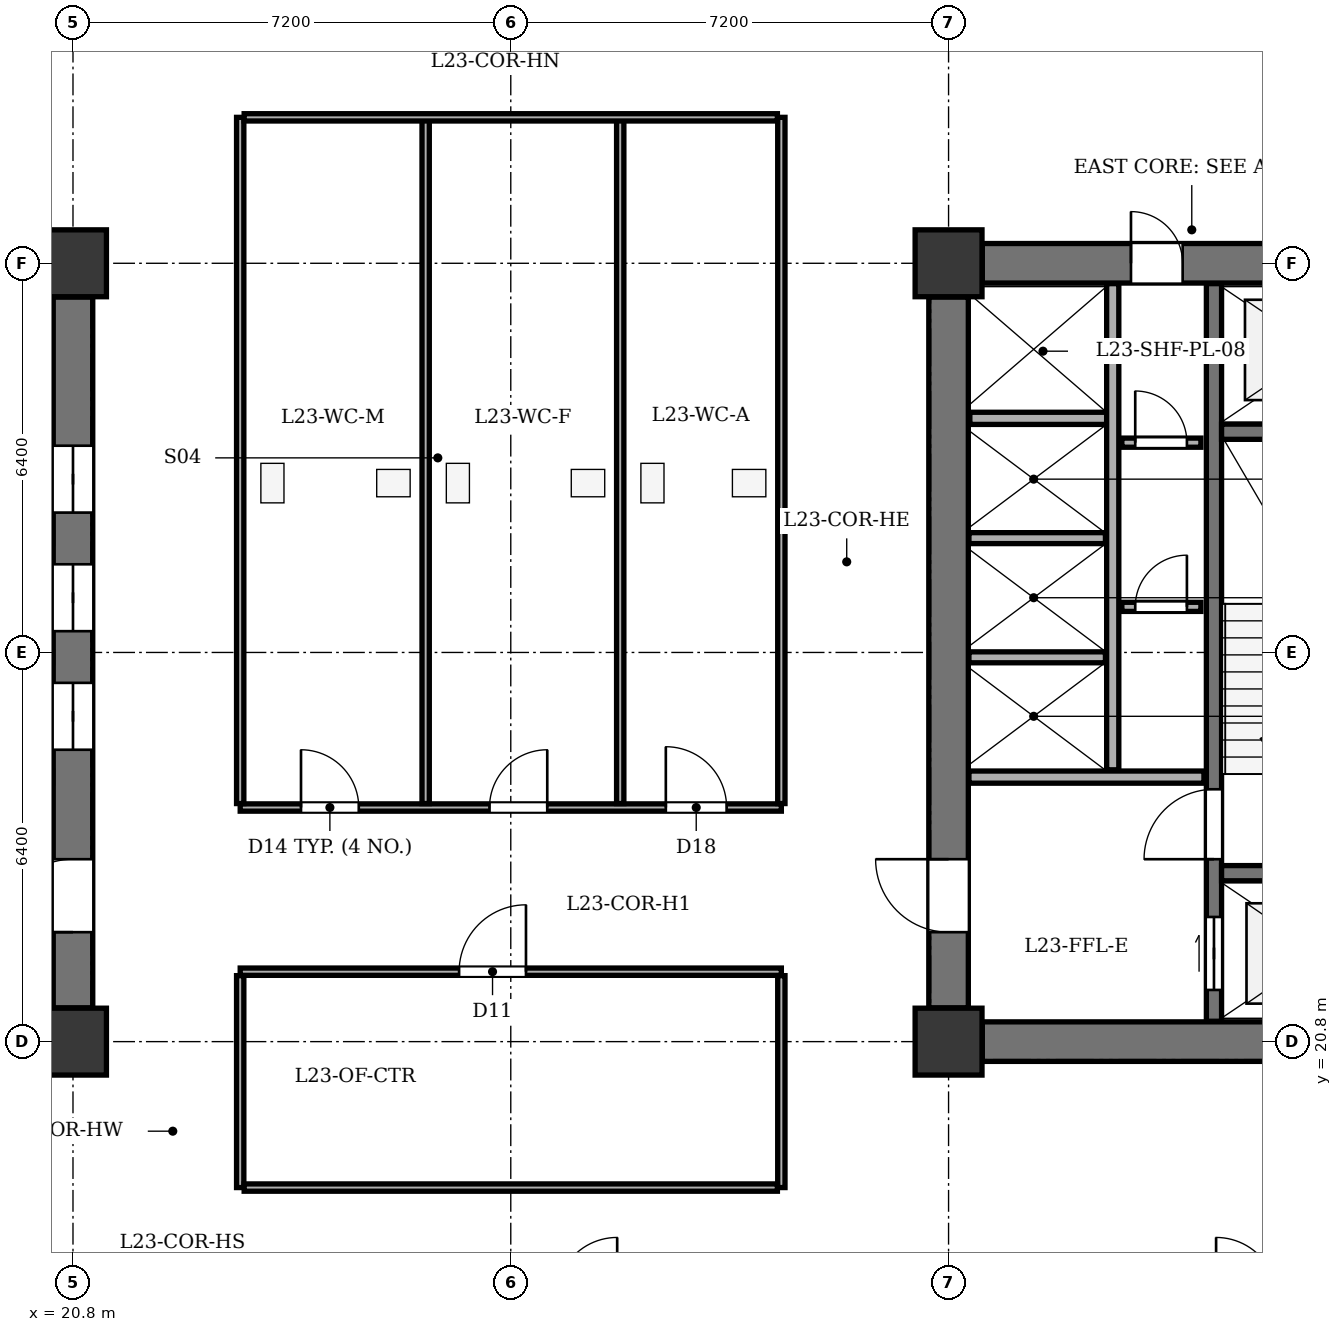
"""IFC4 building model, lengths in metres.
Left out: names, types, materials, properties, quantities, classifications, styles, units other than length and angle.
Written with IfcOpenShell. Run it as: python <this file> out.ifc"""

import sys

from ifc_helpers import new_model, si_unit, direction, frame, frame_2d, origin, origin_2d, place, context, subcontext, project, spatial, rectangle, extrude, element, fill, save


model = new_model("IFC4")
c1 = context("Model", 3, precision=1e-05, world=origin(), true_north=direction((0.0, 1.0)))
c2 = subcontext(c1, "Body", "Model", "MODEL_VIEW")
j1 = project(units=[si_unit("LENGTHUNIT", "METRE"), si_unit("PLANEANGLEUNIT", "RADIAN")], contexts=[c1])
p1 = place(None, origin())
s1 = spatial("IfcSite", under=j1, at=p1, CompositionType="ELEMENT")
p2 = place(p1, origin())
s2 = spatial("IfcBuilding", under=s1, at=p2, CompositionType="ELEMENT")
p3 = place(p2, frame((0.0, 0.0, 94.5)))
s3 = spatial("IfcBuildingStorey", under=s2, at=p3, CompositionType="ELEMENT", Elevation=94.5)
for number, where, z_axis, x_axis in (
    (1, (20.8, 20.8, 0.0), (0.0, 0.0, 1.0), (1.0, 0.0, 0.0)),
    (2, (20.8, 33.6, 0.0), (0.0, 0.0, 1.0), (1.0, 0.0, 0.0)),
    (3, (35.2, 20.8, 0.0), (0.0, 0.0, 1.0), (1.0, 0.0, 0.0)),
    (4, (35.2, 33.6, 0.0), (0.0, 0.0, 1.0), (1.0, 0.0, 0.0)),
):
    element("IfcColumn", number, at=place(p3, frame(where, z_axis=z_axis, x_axis=x_axis)), inside=s3, PredefinedType="COLUMN", context=c2, shape_type="SweptSolid", body=[
        extrude(rectangle(XDim=1.1, YDim=1.1, at=origin_2d()), origin(), (0.0, 0.0, 1.0), 3.9),
    ])
p4 = place(p3, frame((20.8, 21.355, 0.0), z_axis=(0.0, 0.0, 1.0), x_axis=(0.0, 1.0, 0.0)))
e5 = element("IfcWall", 5, at=p4, inside=s3, PredefinedType="SHEAR", context=c2, shape_type="SweptSolid", body=[
    extrude(rectangle(XDim=11.69, YDim=0.65, at=frame_2d((5.845, 0.0))), origin(), (0.0, 0.0, 1.0), 3.6),
])
p5 = place(p4, frame((1.245, 0.0, 0.0)))
e6 = element("IfcOpeningElement", 6, at=p5, cuts=e5, PredefinedType="OPENING", context=c2, shape_type="SweptSolid", body=[
    extrude(rectangle(XDim=1.2, YDim=2.15, at=frame_2d((0.6, 1.075))), frame((0.0, 0.335, 0.0), z_axis=(0.0, -1.0, 0.0), x_axis=(1.0, 0.0, 0.0)), (0.0, 0.0, 1.0), 0.67),
])
p6 = place(p4, frame((4.245, 0.0, 0.0)))
e7 = element("IfcOpeningElement", 7, at=p6, cuts=e5, PredefinedType="OPENING", context=c2, shape_type="SweptSolid", body=[
    extrude(rectangle(XDim=1.1, YDim=2.1, at=frame_2d((0.55, 1.05))), frame((0.0, 0.335, 0.0), z_axis=(0.0, -1.0, 0.0), x_axis=(1.0, 0.0, 0.0)), (0.0, 0.0, 1.0), 0.67),
])
p7 = place(p4, frame((6.195, 0.0, 0.0)))
e8 = element("IfcOpeningElement", 8, at=p7, cuts=e5, PredefinedType="OPENING", context=c2, shape_type="SweptSolid", body=[
    extrude(rectangle(XDim=1.1, YDim=2.1, at=frame_2d((0.55, 1.05))), frame((0.0, 0.335, 0.0), z_axis=(0.0, -1.0, 0.0), x_axis=(1.0, 0.0, 0.0)), (0.0, 0.0, 1.0), 0.67),
])
p8 = place(p4, frame((8.145, 0.0, 0.0)))
e9 = element("IfcOpeningElement", 9, at=p8, cuts=e5, PredefinedType="OPENING", context=c2, shape_type="SweptSolid", body=[
    extrude(rectangle(XDim=1.1, YDim=2.1, at=frame_2d((0.55, 1.05))), frame((0.0, 0.335, 0.0), z_axis=(0.0, -1.0, 0.0), x_axis=(1.0, 0.0, 0.0)), (0.0, 0.0, 1.0), 0.67),
])
p9 = place(p3, frame((16.6, 25.15, 0.0), z_axis=(0.0, 0.0, 1.0), x_axis=(1.0, 0.0, 0.0)))
e10 = element("IfcWall", 10, at=p9, inside=s3, PredefinedType="SOLIDWALL", context=c2, shape_type="SweptSolid", body=[
    extrude(rectangle(XDim=3.865, YDim=0.2, at=frame_2d((1.933, 0.0))), origin(), (0.0, 0.0, 1.0), 3.6),
])
p10 = place(p9, frame((0.3, 0.0, 0.0)))
e11 = element("IfcOpeningElement", 11, at=p10, cuts=e10, PredefinedType="OPENING", context=c2, shape_type="SweptSolid", body=[
    extrude(rectangle(XDim=0.85, YDim=2.02, at=frame_2d((0.425, 1.01))), frame((0.0, 0.11, 0.0), z_axis=(0.0, -1.0, 0.0), x_axis=(1.0, 0.0, 0.0)), (0.0, 0.0, 1.0), 0.22),
])
for number, where, z_axis, x_axis in (
    (12, (18.22, 27.12, 0.0), (0.0, 0.0, 1.0), (1.0, 0.0, 0.0)),
    (13, (18.22, 29.08, 0.0), (0.0, 0.0, 1.0), (1.0, 0.0, 0.0)),
):
    element("IfcWall", number, at=place(p3, frame(where, z_axis=z_axis, x_axis=x_axis)), inside=s3, PredefinedType="PARTITIONING", context=c2, shape_type="SweptSolid", body=[
        extrude(rectangle(XDim=2.245, YDim=0.18, at=frame_2d((1.123, 0.0))), origin(), (0.0, 0.0, 1.0), 3.6),
    ])
p11 = place(p3, frame((35.755, 20.8, 0.0), z_axis=(0.0, 0.0, 1.0), x_axis=(1.0, 0.0, 0.0)))
e14 = element("IfcWall", 14, at=p11, inside=s3, PredefinedType="SHEAR", context=c2, shape_type="SweptSolid", body=[
    extrude(rectangle(XDim=6.89, YDim=0.65, at=frame_2d((3.445, 0.0))), origin(), (0.0, 0.0, 1.0), 3.6),
])
p12 = place(p3, frame((35.755, 33.6, 0.0), z_axis=(0.0, 0.0, 1.0), x_axis=(1.0, 0.0, 0.0)))
e15 = element("IfcWall", 15, at=p12, inside=s3, PredefinedType="SHEAR", context=c2, shape_type="SweptSolid", body=[
    extrude(rectangle(XDim=6.89, YDim=0.65, at=frame_2d((3.445, 0.0))), origin(), (0.0, 0.0, 1.0), 3.6),
])
p13 = place(p12, frame((4.645, 0.0, 0.0)))
e16 = element("IfcOpeningElement", 16, at=p13, cuts=e15, PredefinedType="OPENING", context=c2, shape_type="SweptSolid", body=[
    extrude(rectangle(XDim=1.3, YDim=2.15, at=frame_2d((0.65, 1.075))), frame((0.0, 0.335, 0.0), z_axis=(0.0, -1.0, 0.0), x_axis=(1.0, 0.0, 0.0)), (0.0, 0.0, 1.0), 0.67),
])
p14 = place(p12, frame((2.445, 0.0, 0.0)))
e17 = element("IfcOpeningElement", 17, at=p14, cuts=e15, PredefinedType="OPENING", context=c2, shape_type="SweptSolid", body=[
    extrude(rectangle(XDim=0.85, YDim=2.02, at=frame_2d((0.425, 1.01))), frame((0.0, 0.335, 0.0), z_axis=(0.0, -1.0, 0.0), x_axis=(1.0, 0.0, 0.0)), (0.0, 0.0, 1.0), 0.67),
])
p15 = place(p3, frame((35.2, 21.355, 0.0), z_axis=(0.0, 0.0, 1.0), x_axis=(0.0, 1.0, 0.0)))
e18 = element("IfcWall", 18, at=p15, inside=s3, PredefinedType="SHEAR", context=c2, shape_type="SweptSolid", body=[
    extrude(rectangle(XDim=11.69, YDim=0.65, at=frame_2d((5.845, 0.0))), origin(), (0.0, 0.0, 1.0), 3.6),
])
p16 = place(p15, frame((1.245, 0.0, 0.0)))
e19 = element("IfcOpeningElement", 19, at=p16, cuts=e18, PredefinedType="OPENING", context=c2, shape_type="SweptSolid", body=[
    extrude(rectangle(XDim=1.2, YDim=2.15, at=frame_2d((0.6, 1.075))), frame((0.0, 0.335, 0.0), z_axis=(0.0, -1.0, 0.0), x_axis=(1.0, 0.0, 0.0)), (0.0, 0.0, 1.0), 0.67),
])
p17 = place(p3, frame((39.565, 21.135, 0.0), z_axis=(0.0, 0.0, 1.0), x_axis=(0.0, 1.0, 0.0)))
e20 = element("IfcWall", 20, at=p17, inside=s3, PredefinedType="SHEAR", context=c2, shape_type="SweptSolid", body=[
    extrude(rectangle(XDim=12.13, YDim=0.25, at=frame_2d((6.065, 0.0))), origin(), (0.0, 0.0, 1.0), 3.6),
])
p18 = place(p17, frame((0.515, 0.0, 0.0)))
e21 = element("IfcOpeningElement", 21, at=p18, cuts=e20, PredefinedType="OPENING", context=c2, shape_type="SweptSolid", body=[
    extrude(rectangle(XDim=1.2, YDim=2.15, at=frame_2d((0.6, 1.075))), frame((0.0, 0.135, 0.0), z_axis=(0.0, -1.0, 0.0), x_axis=(1.0, 0.0, 0.0)), (0.0, 0.0, 1.0), 0.27),
])
p19 = place(p17, frame((2.665, 0.0, 0.0)))
e22 = element("IfcOpeningElement", 22, at=p19, cuts=e20, PredefinedType="OPENING", context=c2, shape_type="SweptSolid", body=[
    extrude(rectangle(XDim=1.15, YDim=2.15, at=frame_2d((0.575, 1.075))), frame((0.0, 0.135, 0.0), z_axis=(0.0, -1.0, 0.0), x_axis=(1.0, 0.0, 0.0)), (0.0, 0.0, 1.0), 0.27),
])
for number, where, z_axis, x_axis in (
    (23, (39.69, 23.57, 0.0), (0.0, 0.0, 1.0), (1.0, 0.0, 0.0)),
    (24, (39.69, 30.83, 0.0), (0.0, 0.0, 1.0), (1.0, 0.0, 0.0)),
):
    element("IfcWall", number, at=place(p3, frame(where, z_axis=z_axis, x_axis=x_axis)), inside=s3, PredefinedType="SHEAR", context=c2, shape_type="SweptSolid", body=[
        extrude(rectangle(XDim=3.175, YDim=0.25, at=frame_2d((1.587, 0.0))), origin(), (0.0, 0.0, 1.0), 3.6),
    ])
p20 = place(p3, frame((35.535, 25.15, 0.0), z_axis=(0.0, 0.0, 1.0), x_axis=(1.0, 0.0, 0.0)))
e25 = element("IfcWall", 25, at=p20, inside=s3, PredefinedType="SOLIDWALL", context=c2, shape_type="SweptSolid", body=[
    extrude(rectangle(XDim=3.865, YDim=0.2, at=frame_2d((1.933, 0.0))), origin(), (0.0, 0.0, 1.0), 3.6),
])
p21 = place(p3, frame((35.55, 31.05, 0.0), z_axis=(0.0, 0.0, 1.0), x_axis=(1.0, 0.0, 0.0)))
e26 = element("IfcWall", 26, at=p21, inside=s3, PredefinedType="SOLIDWALL", context=c2, shape_type="SweptSolid", body=[
    extrude(rectangle(XDim=2.25, YDim=0.2, at=frame_2d((1.125, 0.0))), origin(), (0.0, 0.0, 1.0), 3.6),
])
p22 = place(p3, frame((37.9, 25.27, 0.0), z_axis=(0.0, 0.0, 1.0), x_axis=(0.0, 1.0, 0.0)))
e27 = element("IfcWall", 27, at=p22, inside=s3, PredefinedType="SOLIDWALL", context=c2, shape_type="SweptSolid", body=[
    extrude(rectangle(XDim=7.995, YDim=0.2, at=frame_2d((3.998, 0.0))), origin(), (0.0, 0.0, 1.0), 3.6),
])
for number, where, z_axis, x_axis in (
    (28, (35.535, 27.12, 0.0), (0.0, 0.0, 1.0), (1.0, 0.0, 0.0)),
    (29, (35.535, 29.08, 0.0), (0.0, 0.0, 1.0), (1.0, 0.0, 0.0)),
):
    element("IfcWall", number, at=place(p3, frame(where, z_axis=z_axis, x_axis=x_axis)), inside=s3, PredefinedType="PARTITIONING", context=c2, shape_type="SweptSolid", body=[
        extrude(rectangle(XDim=2.245, YDim=0.18, at=frame_2d((1.123, 0.0))), origin(), (0.0, 0.0, 1.0), 3.6),
    ])
p23 = place(p3, frame((38.05, 27.95, 0.0), z_axis=(0.0, 0.0, 1.0), x_axis=(1.0, 0.0, 0.0)))
e30 = element("IfcWall", 30, at=p23, inside=s3, PredefinedType="PARTITIONING", context=c2, shape_type="SweptSolid", body=[
    extrude(rectangle(XDim=1.3, YDim=0.15, at=frame_2d((0.65, 0.0))), origin(), (0.0, 0.0, 1.0), 3.6),
])
p24 = place(p23, frame((0.22, 0.0, 0.0)))
e31 = element("IfcOpeningElement", 31, at=p24, cuts=e30, PredefinedType="OPENING", context=c2, shape_type="SweptSolid", body=[
    extrude(rectangle(XDim=0.85, YDim=2.02, at=frame_2d((0.425, 1.01))), frame((0.0, 0.085, 0.0), z_axis=(0.0, -1.0, 0.0), x_axis=(1.0, 0.0, 0.0)), (0.0, 0.0, 1.0), 0.17),
])
p25 = place(p3, frame((38.05, 30.65, 0.0), z_axis=(0.0, 0.0, 1.0), x_axis=(1.0, 0.0, 0.0)))
e32 = element("IfcWall", 32, at=p25, inside=s3, PredefinedType="PARTITIONING", context=c2, shape_type="SweptSolid", body=[
    extrude(rectangle(XDim=1.3, YDim=0.15, at=frame_2d((0.65, 0.0))), origin(), (0.0, 0.0, 1.0), 3.6),
])
p26 = place(p25, frame((0.22, 0.0, 0.0)))
e33 = element("IfcOpeningElement", 33, at=p26, cuts=e32, PredefinedType="OPENING", context=c2, shape_type="SweptSolid", body=[
    extrude(rectangle(XDim=0.85, YDim=2.02, at=frame_2d((0.425, 1.01))), frame((0.0, 0.085, 0.0), z_axis=(0.0, -1.0, 0.0), x_axis=(1.0, 0.0, 0.0)), (0.0, 0.0, 1.0), 0.17),
])
p27 = place(p3, frame((23.55, 24.65, 0.0), z_axis=(0.0, 0.0, 1.0), x_axis=(1.0, 0.0, 0.0)))
e34 = element("IfcWall", 34, at=p27, inside=s3, PredefinedType="PARTITIONING", context=c2, shape_type="SweptSolid", body=[
    extrude(rectangle(XDim=8.9, YDim=0.12, at=frame_2d((4.45, 0.0))), origin(), (0.0, 0.0, 1.0), 3.135),
])
p28 = place(p27, frame((1.0, 0.0, 0.0)))
e35 = element("IfcOpeningElement", 35, at=p28, cuts=e34, PredefinedType="OPENING", context=c2, shape_type="SweptSolid", body=[
    extrude(rectangle(XDim=0.95, YDim=2.1, at=frame_2d((0.475, 1.05))), frame((0.0, 0.07, 0.0), z_axis=(0.0, -1.0, 0.0), x_axis=(1.0, 0.0, 0.0)), (0.0, 0.0, 1.0), 0.14),
])
p29 = place(p27, frame((4.1, 0.0, 0.0)))
e36 = element("IfcOpeningElement", 36, at=p29, cuts=e34, PredefinedType="OPENING", context=c2, shape_type="SweptSolid", body=[
    extrude(rectangle(XDim=0.95, YDim=2.1, at=frame_2d((0.475, 1.05))), frame((0.0, 0.07, 0.0), z_axis=(0.0, -1.0, 0.0), x_axis=(1.0, 0.0, 0.0)), (0.0, 0.0, 1.0), 0.14),
])
p30 = place(p27, frame((7.0, 0.0, 0.0)))
e37 = element("IfcOpeningElement", 37, at=p30, cuts=e34, PredefinedType="OPENING", context=c2, shape_type="SweptSolid", body=[
    extrude(rectangle(XDim=1.0, YDim=2.1, at=frame_2d((0.5, 1.05))), frame((0.0, 0.07, 0.0), z_axis=(0.0, -1.0, 0.0), x_axis=(1.0, 0.0, 0.0)), (0.0, 0.0, 1.0), 0.14),
])
for number, where, z_axis, x_axis in (
    (38, (23.55, 24.715, 0.0), (0.0, 0.0, 1.0), (0.0, 1.0, 0.0)),
    (39, (32.45, 24.715, 0.0), (0.0, 0.0, 1.0), (0.0, 1.0, 0.0)),
    (40, (26.6, 24.715, 0.0), (0.0, 0.0, 1.0), (0.0, 1.0, 0.0)),
):
    element("IfcWall", number, at=place(p3, frame(where, z_axis=z_axis, x_axis=x_axis)), inside=s3, PredefinedType="PARTITIONING", context=c2, shape_type="SweptSolid", body=[
        extrude(rectangle(XDim=11.285, YDim=0.12, at=frame_2d((5.643, 0.0))), origin(), (0.0, 0.0, 1.0), 3.6),
    ])
p31 = place(p3, frame((29.8, 24.715, 0.0), z_axis=(0.0, 0.0, 1.0), x_axis=(0.0, 1.0, 0.0)))
e41 = element("IfcWall", 41, at=p31, inside=s3, PredefinedType="PARTITIONING", context=c2, shape_type="SweptSolid", body=[
    extrude(rectangle(XDim=11.285, YDim=0.12, at=frame_2d((5.643, 0.0))), origin(), (0.0, 0.0, 1.0), 3.135),
])
p32 = place(p3, frame((23.615, 36.0, 0.0), z_axis=(0.0, 0.0, 1.0), x_axis=(1.0, 0.0, 0.0)))
e42 = element("IfcWall", 42, at=p32, inside=s3, PredefinedType="PARTITIONING", context=c2, shape_type="SweptSolid", body=[
    extrude(rectangle(XDim=8.77, YDim=0.12, at=frame_2d((4.385, 0.0))), origin(), (0.0, 0.0, 1.0), 3.6),
])
p33 = place(p3, frame((23.55, 21.95, 0.0), z_axis=(0.0, 0.0, 1.0), x_axis=(1.0, 0.0, 0.0)))
e43 = element("IfcWall", 43, at=p33, inside=s3, PredefinedType="PARTITIONING", context=c2, shape_type="SweptSolid", body=[
    extrude(rectangle(XDim=8.9, YDim=0.12, at=frame_2d((4.45, 0.0))), origin(), (0.0, 0.0, 1.0), 3.135),
])
p34 = place(p33, frame((3.6, 0.0, 0.0)))
e44 = element("IfcOpeningElement", 44, at=p34, cuts=e43, PredefinedType="OPENING", context=c2, shape_type="SweptSolid", body=[
    extrude(rectangle(XDim=1.1, YDim=2.15, at=frame_2d((0.55, 1.075))), frame((0.0, 0.07, 0.0), z_axis=(0.0, -1.0, 0.0), x_axis=(1.0, 0.0, 0.0)), (0.0, 0.0, 1.0), 0.14),
])
for number, where, z_axis, x_axis in (
    (45, (23.55, 18.4, 0.0), (0.0, 0.0, 1.0), (0.0, 1.0, 0.0)),
    (46, (32.45, 18.4, 0.0), (0.0, 0.0, 1.0), (0.0, 1.0, 0.0)),
):
    element("IfcWall", number, at=place(p3, frame(where, z_axis=z_axis, x_axis=x_axis)), inside=s3, PredefinedType="PARTITIONING", context=c2, shape_type="SweptSolid", body=[
        extrude(rectangle(XDim=3.485, YDim=0.12, at=frame_2d((1.743, 0.0))), origin(), (0.0, 0.0, 1.0), 3.6),
    ])
p35 = place(p3, frame((23.615, 18.4, 0.0), z_axis=(0.0, 0.0, 1.0), x_axis=(1.0, 0.0, 0.0)))
e47 = element("IfcWall", 47, at=p35, inside=s3, PredefinedType="PARTITIONING", context=c2, shape_type="SweptSolid", body=[
    extrude(rectangle(XDim=8.77, YDim=0.12, at=frame_2d((4.385, 0.0))), origin(), (0.0, 0.0, 1.0), 3.6),
])
p36 = place(p5, origin())
e48 = element("IfcDoor", 48, at=p36, inside=s3, OperationType="SINGLE_SWING_LEFT", PredefinedType="DOOR", context=c2, shape_type="SweptSolid", body=[
    extrude(rectangle(XDim=1.2, YDim=2.15, at=frame_2d((0.6, 1.075))), frame((0.0, 0.025, 0.0), z_axis=(0.0, -1.0, 0.0), x_axis=(1.0, 0.0, 0.0)), (0.0, 0.0, 1.0), 0.05),
])
fill(e6, e48)
p37 = place(p6, origin())
e49 = element("IfcDoor", 49, at=p37, inside=s3, OperationType="DOUBLE_DOOR_SLIDING", PredefinedType="DOOR", context=c2, shape_type="SweptSolid", body=[
    extrude(rectangle(XDim=1.1, YDim=2.1, at=frame_2d((0.55, 1.05))), frame((0.0, 0.025, 0.0), z_axis=(0.0, -1.0, 0.0), x_axis=(1.0, 0.0, 0.0)), (0.0, 0.0, 1.0), 0.05),
])
fill(e7, e49)
p38 = place(p7, origin())
e50 = element("IfcDoor", 50, at=p38, inside=s3, OperationType="DOUBLE_DOOR_SLIDING", PredefinedType="DOOR", context=c2, shape_type="SweptSolid", body=[
    extrude(rectangle(XDim=1.1, YDim=2.1, at=frame_2d((0.55, 1.05))), frame((0.0, 0.025, 0.0), z_axis=(0.0, -1.0, 0.0), x_axis=(1.0, 0.0, 0.0)), (0.0, 0.0, 1.0), 0.05),
])
fill(e8, e50)
p39 = place(p8, origin())
e51 = element("IfcDoor", 51, at=p39, inside=s3, OperationType="DOUBLE_DOOR_SLIDING", PredefinedType="DOOR", context=c2, shape_type="SweptSolid", body=[
    extrude(rectangle(XDim=1.1, YDim=2.1, at=frame_2d((0.55, 1.05))), frame((0.0, 0.025, 0.0), z_axis=(0.0, -1.0, 0.0), x_axis=(1.0, 0.0, 0.0)), (0.0, 0.0, 1.0), 0.05),
])
fill(e9, e51)
p40 = place(p14, origin())
e52 = element("IfcDoor", 52, at=p40, inside=s3, OperationType="SINGLE_SWING_LEFT", PredefinedType="DOOR", context=c2, shape_type="SweptSolid", body=[
    extrude(rectangle(XDim=0.85, YDim=2.02, at=frame_2d((0.425, 1.01))), frame((0.0, 0.025, 0.0), z_axis=(0.0, -1.0, 0.0), x_axis=(1.0, 0.0, 0.0)), (0.0, 0.0, 1.0), 0.05),
])
fill(e17, e52)
p41 = place(p16, origin())
e53 = element("IfcDoor", 53, at=p41, inside=s3, OperationType="SINGLE_SWING_RIGHT", PredefinedType="DOOR", context=c2, shape_type="SweptSolid", body=[
    extrude(rectangle(XDim=1.2, YDim=2.15, at=frame_2d((0.6, 1.075))), frame((0.0, 0.025, 0.0), z_axis=(0.0, -1.0, 0.0), x_axis=(1.0, 0.0, 0.0)), (0.0, 0.0, 1.0), 0.05),
])
fill(e19, e53)
p42 = place(p18, origin())
e54 = element("IfcDoor", 54, at=p42, inside=s3, OperationType="DOUBLE_DOOR_SLIDING", PredefinedType="DOOR", context=c2, shape_type="SweptSolid", body=[
    extrude(rectangle(XDim=1.2, YDim=2.15, at=frame_2d((0.6, 1.075))), frame((0.0, 0.025, 0.0), z_axis=(0.0, -1.0, 0.0), x_axis=(1.0, 0.0, 0.0)), (0.0, 0.0, 1.0), 0.05),
])
fill(e21, e54)
p43 = place(p19, origin())
e55 = element("IfcDoor", 55, at=p43, inside=s3, OperationType="SINGLE_SWING_LEFT", PredefinedType="DOOR", context=c2, shape_type="SweptSolid", body=[
    extrude(rectangle(XDim=1.15, YDim=2.15, at=frame_2d((0.575, 1.075))), frame((0.0, 0.025, 0.0), z_axis=(0.0, -1.0, 0.0), x_axis=(1.0, 0.0, 0.0)), (0.0, 0.0, 1.0), 0.05),
])
fill(e22, e55)
p44 = place(p24, origin())
e56 = element("IfcDoor", 56, at=p44, inside=s3, OperationType="SINGLE_SWING_RIGHT", PredefinedType="DOOR", context=c2, shape_type="SweptSolid", body=[
    extrude(rectangle(XDim=0.85, YDim=2.02, at=frame_2d((0.425, 1.01))), frame((0.0, 0.025, 0.0), z_axis=(0.0, -1.0, 0.0), x_axis=(1.0, 0.0, 0.0)), (0.0, 0.0, 1.0), 0.05),
])
fill(e31, e56)
p45 = place(p26, origin())
e57 = element("IfcDoor", 57, at=p45, inside=s3, OperationType="SINGLE_SWING_LEFT", PredefinedType="DOOR", context=c2, shape_type="SweptSolid", body=[
    extrude(rectangle(XDim=0.85, YDim=2.02, at=frame_2d((0.425, 1.01))), frame((0.0, 0.025, 0.0), z_axis=(0.0, -1.0, 0.0), x_axis=(1.0, 0.0, 0.0)), (0.0, 0.0, 1.0), 0.05),
])
fill(e33, e57)
p46 = place(p28, origin())
e58 = element("IfcDoor", 58, at=p46, inside=s3, OperationType="SINGLE_SWING_LEFT", PredefinedType="DOOR", context=c2, shape_type="SweptSolid", body=[
    extrude(rectangle(XDim=0.95, YDim=2.1, at=frame_2d((0.475, 1.05))), frame((0.0, 0.025, 0.0), z_axis=(0.0, -1.0, 0.0), x_axis=(1.0, 0.0, 0.0)), (0.0, 0.0, 1.0), 0.05),
])
fill(e35, e58)
p47 = place(p29, origin())
e59 = element("IfcDoor", 59, at=p47, inside=s3, OperationType="SINGLE_SWING_RIGHT", PredefinedType="DOOR", context=c2, shape_type="SweptSolid", body=[
    extrude(rectangle(XDim=0.95, YDim=2.1, at=frame_2d((0.475, 1.05))), frame((0.0, 0.025, 0.0), z_axis=(0.0, -1.0, 0.0), x_axis=(1.0, 0.0, 0.0)), (0.0, 0.0, 1.0), 0.05),
])
fill(e36, e59)
p48 = place(p30, origin())
e60 = element("IfcDoor", 60, at=p48, inside=s3, OperationType="SINGLE_SWING_LEFT", PredefinedType="DOOR", context=c2, shape_type="SweptSolid", body=[
    extrude(rectangle(XDim=1.0, YDim=2.1, at=frame_2d((0.5, 1.05))), frame((0.0, 0.025, 0.0), z_axis=(0.0, -1.0, 0.0), x_axis=(1.0, 0.0, 0.0)), (0.0, 0.0, 1.0), 0.05),
])
fill(e37, e60)
p49 = place(p34, origin())
e61 = element("IfcDoor", 61, at=p49, inside=s3, OperationType="SINGLE_SWING_RIGHT", PredefinedType="DOOR", context=c2, shape_type="SweptSolid", body=[
    extrude(rectangle(XDim=1.1, YDim=2.15, at=frame_2d((0.55, 1.075))), frame((0.0, 0.025, 0.0), z_axis=(0.0, -1.0, 0.0), x_axis=(1.0, 0.0, 0.0)), (0.0, 0.0, 1.0), 0.05),
])
fill(e44, e61)
save(model, sys.argv[1])
